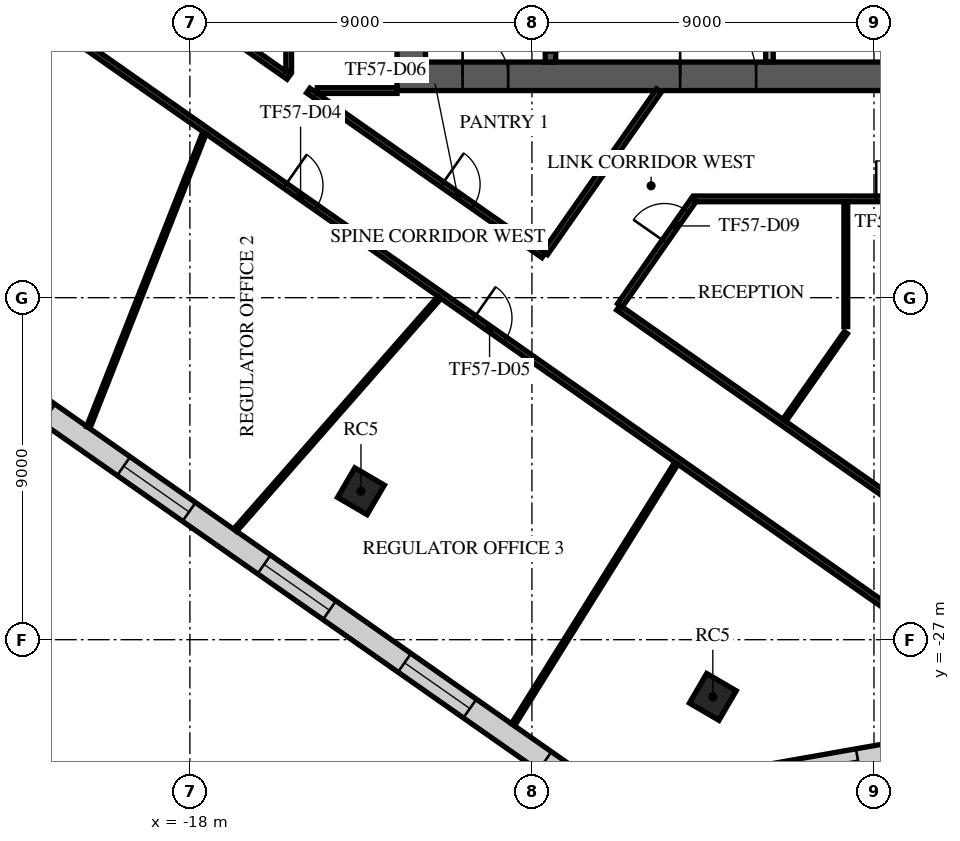
"""IFC4 building model, lengths in metres.
Left out: names, types, materials, properties, quantities, classifications, styles, units other than length and angle.
Written with IfcOpenShell. Run it as: python <this file> out.ifc"""

import sys

from ifc_helpers import new_model, si_unit, direction, frame, frame_2d, origin, origin_2d, place, context, subcontext, project, spatial, rectangle, extrude, element, fill, save


model = new_model("IFC4")
c1 = context("Model", 3, precision=1e-05, world=origin(), true_north=direction((0.0, 1.0)))
c2 = subcontext(c1, "Body", "Model", "MODEL_VIEW")
j1 = project(units=[si_unit("LENGTHUNIT", "METRE"), si_unit("PLANEANGLEUNIT", "RADIAN")], contexts=[c1])
p1 = place(None, origin())
s1 = spatial("IfcSite", under=j1, at=p1, CompositionType="ELEMENT")
p2 = place(p1, origin())
s2 = spatial("IfcBuilding", under=s1, at=p2, CompositionType="ELEMENT")
p3 = place(p2, frame((0.0, 0.0, 242.9)))
s3 = spatial("IfcBuildingStorey", under=s2, at=p3, CompositionType="ELEMENT", Elevation=242.9)
for number, where, z_axis, x_axis in (
    (1, (-13.499, -23.094, -0.36), (0.0, 0.0, 1.0), (0.505, 0.863, 0.0)),
    (2, (-4.24, -28.506, -0.36), (0.0, 0.0, 1.0), (0.505, 0.863, 0.0)),
):
    element("IfcColumn", number, at=place(p3, frame(where, z_axis=z_axis, x_axis=x_axis)), inside=s3, PredefinedType="COLUMN", context=c2, shape_type="SweptSolid", body=[
        extrude(rectangle(XDim=0.9, YDim=0.9, at=origin_2d()), origin(), (0.0, 0.0, 1.0), 4.36),
    ])
p4 = place(p3, frame((-12.55, -12.175, 0.0), z_axis=(0.0, 0.0, 1.0), x_axis=(1.0, 0.0, 0.0)))
e3 = element("IfcWall", 3, at=p4, inside=s3, PredefinedType="SHEAR", context=c2, shape_type="SweptSolid", body=[
    extrude(rectangle(XDim=25.1, YDim=0.75, at=frame_2d((12.55, 0.0))), origin(), (0.0, 0.0, 1.0), 3.64),
])
p5 = place(p4, frame((7.45, 0.0, 0.0)))
e4 = element("IfcOpeningElement", 4, at=p5, cuts=e3, PredefinedType="OPENING", context=c2, shape_type="SweptSolid", body=[
    extrude(rectangle(XDim=2.0, YDim=2.1, at=frame_2d((1.0, 1.05))), frame((0.0, 0.385, 0.0), z_axis=(0.0, -1.0, 0.0), x_axis=(1.0, 0.0, 0.0)), (0.0, 0.0, 1.0), 0.77),
])
p6 = place(p4, frame((17.575, 0.0, 0.0)))
e5 = element("IfcOpeningElement", 5, at=p6, cuts=e3, PredefinedType="OPENING", context=c2, shape_type="SweptSolid", body=[
    extrude(rectangle(XDim=1.2, YDim=2.1, at=frame_2d((0.6, 1.05))), frame((0.0, 0.385, 0.0), z_axis=(0.0, -1.0, 0.0), x_axis=(1.0, 0.0, 0.0)), (0.0, 0.0, 1.0), 0.77),
])
p7 = place(p4, frame((1.725, 0.0, 0.0)))
e6 = element("IfcOpeningElement", 6, at=p7, cuts=e3, PredefinedType="OPENING", context=c2, shape_type="SweptSolid", body=[
    extrude(rectangle(XDim=1.2, YDim=2.1, at=frame_2d((0.6, 1.05))), frame((0.0, 0.385, 0.0), z_axis=(0.0, -1.0, 0.0), x_axis=(1.0, 0.0, 0.0)), (0.0, 0.0, 1.0), 0.77),
])
p8 = place(p4, frame((22.175, 0.0, 0.0)))
e7 = element("IfcOpeningElement", 7, at=p8, cuts=e3, PredefinedType="OPENING", context=c2, shape_type="SweptSolid", body=[
    extrude(rectangle(XDim=1.2, YDim=2.1, at=frame_2d((0.6, 1.05))), frame((0.0, 0.385, 0.0), z_axis=(0.0, -1.0, 0.0), x_axis=(1.0, 0.0, 0.0)), (0.0, 0.0, 1.0), 0.77),
])
p9 = place(p3, frame((-12.175, -11.8, 0.0), z_axis=(0.0, 0.0, 1.0), x_axis=(0.0, 1.0, 0.0)))
e8 = element("IfcWall", 8, at=p9, inside=s3, PredefinedType="SHEAR", context=c2, shape_type="SweptSolid", body=[
    extrude(rectangle(XDim=23.6, YDim=0.75, at=frame_2d((11.8, 0.0))), origin(), (0.0, 0.0, 1.0), 3.64),
])
p10 = place(p9, frame((10.6, 0.0, 0.0)))
e9 = element("IfcOpeningElement", 9, at=p10, cuts=e8, PredefinedType="OPENING", context=c2, shape_type="SweptSolid", body=[
    extrude(rectangle(XDim=2.4, YDim=2.4, at=frame_2d((1.2, 1.2))), frame((0.0, 0.385, 0.0), z_axis=(0.0, -1.0, 0.0), x_axis=(1.0, 0.0, 0.0)), (0.0, 0.0, 1.0), 0.77),
])
p11 = place(p3, frame((-8.512, -4.55, 0.0), z_axis=(0.0, 0.0, 1.0), x_axis=(0.0, -1.0, 0.0)))
e10 = element("IfcWall", 10, at=p11, inside=s3, PredefinedType="SOLIDWALL", context=c2, shape_type="SweptSolid", body=[
    extrude(rectangle(XDim=7.25, YDim=0.275, at=frame_2d((3.625, 0.0))), origin(), (0.0, 0.0, 1.0), 3.64),
])
p12 = place(p11, frame((6.0, 0.0, 0.0)))
e11 = element("IfcOpeningElement", 11, at=p12, cuts=e10, PredefinedType="OPENING", context=c2, shape_type="SweptSolid", body=[
    extrude(rectangle(XDim=1.0, YDim=2.1, at=frame_2d((0.5, 1.05))), frame((0.0, 0.147, 0.0), z_axis=(0.0, -1.0, 0.0), x_axis=(1.0, 0.0, 0.0)), (0.0, 0.0, 1.0), 0.295),
])
p13 = place(p3, frame((-2.75, -11.795, 0.0), z_axis=(0.0, 0.0, 1.0), x_axis=(0.0, 1.0, 0.0)))
e12 = element("IfcWall", 12, at=p13, inside=s3, PredefinedType="PARTITIONING", context=c2, shape_type="SweptSolid", body=[
    extrude(rectangle(XDim=2.99, YDim=0.2, at=frame_2d((1.495, 0.0))), origin(), (0.0, 0.0, 1.0), 3.64),
])
p14 = place(p13, frame((0.657, 0.0, 0.0)))
e13 = element("IfcOpeningElement", 13, at=p14, cuts=e12, PredefinedType="OPENING", context=c2, shape_type="SweptSolid", body=[
    extrude(rectangle(XDim=1.8, YDim=2.1, at=frame_2d((0.9, 1.05))), frame((0.0, 0.11, 0.0), z_axis=(0.0, -1.0, 0.0), x_axis=(1.0, 0.0, 0.0)), (0.0, 0.0, 1.0), 0.22),
])
p15 = place(p3, frame((-31.815, -13.98, 0.0), z_axis=(0.0, 0.0, 1.0), x_axis=(0.819151180661, -0.573577669737, 0.0)))
e14 = element("IfcWall", 14, at=p15, inside=s3, PredefinedType="STANDARD", context=c2, shape_type="SweptSolid", body=[
    extrude(rectangle(XDim=36.086, YDim=0.6, at=frame_2d((18.043, 0.0))), origin(), (0.0, 0.0, 1.0), 3.64),
])
p16 = place(p15, frame((1.205, 0.0, 0.9)))
e15 = element("IfcOpeningElement", 15, at=p16, cuts=e14, PredefinedType="OPENING", context=c2, shape_type="SweptSolid", body=[
    extrude(rectangle(XDim=2.1, YDim=2.1, at=frame_2d((1.05, 1.05))), frame((0.0, 0.31, 0.0), z_axis=(0.0, -1.0, 0.0), x_axis=(1.0, 0.0, 0.0)), (0.0, 0.0, 1.0), 0.62),
])
p17 = place(p15, frame((5.716, 0.0, 0.9)))
e16 = element("IfcOpeningElement", 16, at=p17, cuts=e14, PredefinedType="OPENING", context=c2, shape_type="SweptSolid", body=[
    extrude(rectangle(XDim=2.1, YDim=2.1, at=frame_2d((1.05, 1.05))), frame((0.0, 0.31, 0.0), z_axis=(0.0, -1.0, 0.0), x_axis=(1.0, 0.0, 0.0)), (0.0, 0.0, 1.0), 0.62),
])
p18 = place(p15, frame((10.227, 0.0, 0.9)))
e17 = element("IfcOpeningElement", 17, at=p18, cuts=e14, PredefinedType="OPENING", context=c2, shape_type="SweptSolid", body=[
    extrude(rectangle(XDim=2.1, YDim=2.1, at=frame_2d((1.05, 1.05))), frame((0.0, 0.31, 0.0), z_axis=(0.0, -1.0, 0.0), x_axis=(1.0, 0.0, 0.0)), (0.0, 0.0, 1.0), 0.62),
])
p19 = place(p15, frame((14.738, 0.0, 0.9)))
e18 = element("IfcOpeningElement", 18, at=p19, cuts=e14, PredefinedType="OPENING", context=c2, shape_type="SweptSolid", body=[
    extrude(rectangle(XDim=2.1, YDim=2.1, at=frame_2d((1.05, 1.05))), frame((0.0, 0.31, 0.0), z_axis=(0.0, -1.0, 0.0), x_axis=(1.0, 0.0, 0.0)), (0.0, 0.0, 1.0), 0.62),
])
p20 = place(p15, frame((19.249, 0.0, 0.9)))
e19 = element("IfcOpeningElement", 19, at=p20, cuts=e14, PredefinedType="OPENING", context=c2, shape_type="SweptSolid", body=[
    extrude(rectangle(XDim=2.1, YDim=2.1, at=frame_2d((1.05, 1.05))), frame((0.0, 0.31, 0.0), z_axis=(0.0, -1.0, 0.0), x_axis=(1.0, 0.0, 0.0)), (0.0, 0.0, 1.0), 0.62),
])
p21 = place(p15, frame((23.759, 0.0, 0.9)))
e20 = element("IfcOpeningElement", 20, at=p21, cuts=e14, PredefinedType="OPENING", context=c2, shape_type="SweptSolid", body=[
    extrude(rectangle(XDim=2.1, YDim=2.1, at=frame_2d((1.05, 1.05))), frame((0.0, 0.31, 0.0), z_axis=(0.0, -1.0, 0.0), x_axis=(1.0, 0.0, 0.0)), (0.0, 0.0, 1.0), 0.62),
])
p22 = place(p15, frame((28.27, 0.0, 0.9)))
e21 = element("IfcOpeningElement", 21, at=p22, cuts=e14, PredefinedType="OPENING", context=c2, shape_type="SweptSolid", body=[
    extrude(rectangle(XDim=2.1, YDim=2.1, at=frame_2d((1.05, 1.05))), frame((0.0, 0.31, 0.0), z_axis=(0.0, -1.0, 0.0), x_axis=(1.0, 0.0, 0.0)), (0.0, 0.0, 1.0), 0.62),
])
p23 = place(p15, frame((32.781, 0.0, 0.9)))
e22 = element("IfcOpeningElement", 22, at=p23, cuts=e14, PredefinedType="OPENING", context=c2, shape_type="SweptSolid", body=[
    extrude(rectangle(XDim=2.1, YDim=2.1, at=frame_2d((1.05, 1.05))), frame((0.0, 0.31, 0.0), z_axis=(0.0, -1.0, 0.0), x_axis=(1.0, 0.0, 0.0)), (0.0, 0.0, 1.0), 0.62),
])
p24 = place(p3, frame((-3.18, -30.654, 0.0), z_axis=(0.0, 0.0, 1.0), x_axis=(0.98480904719, 0.173640837858, 0.0)))
e23 = element("IfcWall", 23, at=p24, inside=s3, PredefinedType="STANDARD", context=c2, shape_type="SweptSolid", body=[
    extrude(rectangle(XDim=8.0, YDim=0.6, at=frame_2d((4.0, 0.0))), origin(), (0.0, 0.0, 1.0), 3.64),
])
p25 = place(p24, frame((1.2, 0.0, 0.9)))
e24 = element("IfcOpeningElement", 24, at=p25, cuts=e23, PredefinedType="OPENING", context=c2, shape_type="SweptSolid", body=[
    extrude(rectangle(XDim=1.6, YDim=2.1, at=frame_2d((0.8, 1.05))), frame((0.0, 0.31, 0.0), z_axis=(0.0, -1.0, 0.0), x_axis=(1.0, 0.0, 0.0)), (0.0, 0.0, 1.0), 0.62),
])
p26 = place(p24, frame((5.2, 0.0, 0.9)))
e25 = element("IfcOpeningElement", 25, at=p26, cuts=e23, PredefinedType="OPENING", context=c2, shape_type="SweptSolid", body=[
    extrude(rectangle(XDim=1.6, YDim=2.1, at=frame_2d((0.8, 1.05))), frame((0.0, 0.31, 0.0), z_axis=(0.0, -1.0, 0.0), x_axis=(1.0, 0.0, 0.0)), (0.0, 0.0, 1.0), 0.62),
])
p27 = place(p3, frame((-26.231, -7.537, 0.0), z_axis=(0.0, 0.0, 1.0), x_axis=(0.819166569978, -0.573555690959, 0.0)))
e26 = element("IfcWall", 26, at=p27, inside=s3, PredefinedType="PARTITIONING", context=c2, shape_type="SweptSolid", body=[
    extrude(rectangle(XDim=34.403, YDim=0.15, at=frame_2d((17.201, 0.0))), origin(), (0.0, 0.0, 1.0), 3.24),
])
p28 = place(p27, frame((3.05, 0.0, 0.0)))
e27 = element("IfcOpeningElement", 27, at=p28, cuts=e26, PredefinedType="OPENING", context=c2, shape_type="SweptSolid", body=[
    extrude(rectangle(XDim=1.8, YDim=2.1, at=frame_2d((0.9, 1.05))), frame((0.0, 0.085, 0.0), z_axis=(0.0, -1.0, 0.0), x_axis=(1.0, 0.0, 0.0)), (0.0, 0.0, 1.0), 0.17),
])
p29 = place(p27, frame((13.103, 0.0, 0.0)))
e28 = element("IfcOpeningElement", 28, at=p29, cuts=e26, PredefinedType="OPENING", context=c2, shape_type="SweptSolid", body=[
    extrude(rectangle(XDim=1.0, YDim=2.1, at=frame_2d((0.5, 1.05))), frame((0.0, 0.085, 0.0), z_axis=(0.0, -1.0, 0.0), x_axis=(1.0, 0.0, 0.0)), (0.0, 0.0, 1.0), 0.17),
])
p30 = place(p27, frame((19.173, 0.0, 0.0)))
e29 = element("IfcOpeningElement", 29, at=p30, cuts=e26, PredefinedType="OPENING", context=c2, shape_type="SweptSolid", body=[
    extrude(rectangle(XDim=1.0, YDim=2.1, at=frame_2d((0.5, 1.05))), frame((0.0, 0.085, 0.0), z_axis=(0.0, -1.0, 0.0), x_axis=(1.0, 0.0, 0.0)), (0.0, 0.0, 1.0), 0.17),
])
p31 = place(p3, frame((-24.854, -5.571, 0.0), z_axis=(0.0, 0.0, 1.0), x_axis=(0.819176259714, -0.573541851586, 0.0)))
e30 = element("IfcWall", 30, at=p31, inside=s3, PredefinedType="PARTITIONING", context=c2, shape_type="SweptSolid", body=[
    extrude(rectangle(XDim=11.54, YDim=0.15, at=frame_2d((5.77, 0.0))), origin(), (0.0, 0.0, 1.0), 3.24),
])
p32 = place(p31, frame((6.8, 0.0, 0.0)))
e31 = element("IfcOpeningElement", 31, at=p32, cuts=e30, PredefinedType="OPENING", context=c2, shape_type="SweptSolid", body=[
    extrude(rectangle(XDim=1.0, YDim=2.1, at=frame_2d((0.5, 1.05))), frame((0.0, 0.085, 0.0), z_axis=(0.0, -1.0, 0.0), x_axis=(1.0, 0.0, 0.0)), (0.0, 0.0, 1.0), 0.17),
])
p33 = place(p3, frame((-15.4, -12.046, 0.0), z_axis=(0.0, 0.0, 1.0), x_axis=(0.0, 1.0, 0.0)))
e32 = element("IfcWall", 32, at=p33, inside=s3, PredefinedType="PARTITIONING", context=c2, shape_type="SweptSolid", body=[
    extrude(rectangle(XDim=27.446, YDim=0.15, at=frame_2d((13.723, 0.0))), origin(), (0.0, 0.0, 1.0), 3.24),
])
p34 = place(p33, frame((12.961, 0.0, 0.0)))
e33 = element("IfcOpeningElement", 33, at=p34, cuts=e32, PredefinedType="OPENING", context=c2, shape_type="SweptSolid", body=[
    extrude(rectangle(XDim=1.0, YDim=2.1, at=frame_2d((0.5, 1.05))), frame((0.0, 0.085, 0.0), z_axis=(0.0, -1.0, 0.0), x_axis=(1.0, 0.0, 0.0)), (0.0, 0.0, 1.0), 0.17),
])
p35 = place(p3, frame((-14.886, -12.55, 0.0), z_axis=(0.0, 0.0, 1.0), x_axis=(0.819131763787, -0.57360539882, 0.0)))
e34 = element("IfcWall", 34, at=p35, inside=s3, PredefinedType="PARTITIONING", context=c2, shape_type="SweptSolid", body=[
    extrude(rectangle(XDim=7.559, YDim=0.15, at=frame_2d((3.78, 0.0))), origin(), (0.0, 0.0, 1.0), 3.24),
])
p36 = place(p35, frame((4.3, 0.0, 0.0)))
e35 = element("IfcOpeningElement", 35, at=p36, cuts=e34, PredefinedType="OPENING", context=c2, shape_type="SweptSolid", body=[
    extrude(rectangle(XDim=1.0, YDim=2.1, at=frame_2d((0.5, 1.05))), frame((0.0, 0.085, 0.0), z_axis=(0.0, -1.0, 0.0), x_axis=(1.0, 0.0, 0.0)), (0.0, 0.0, 1.0), 0.17),
])
p37 = place(p3, frame((-14.648, -12.55, 0.0), z_axis=(0.0, 0.0, 1.0), x_axis=(1.0, 0.0, 0.0)))
e36 = element("IfcWall", 36, at=p37, inside=s3, PredefinedType="PARTITIONING", context=c2, shape_type="SweptSolid", body=[
    extrude(rectangle(XDim=2.098, YDim=0.15, at=frame_2d((1.049, 0.0))), origin(), (0.0, 0.0, 1.0), 3.24),
])
p38 = place(p3, frame((-8.651, -16.825, 0.0), z_axis=(0.0, 0.0, 1.0), x_axis=(0.57354712093, 0.819172570386, 0.0)))
e37 = element("IfcWall", 37, at=p38, inside=s3, PredefinedType="PARTITIONING", context=c2, shape_type="SweptSolid", body=[
    extrude(rectangle(XDim=5.218, YDim=0.15, at=frame_2d((2.609, 0.0))), origin(), (0.0, 0.0, 1.0), 3.24),
])
p39 = place(p3, frame((-6.728, -18.263, 0.0), z_axis=(0.0, 0.0, 1.0), x_axis=(0.819171177891, -0.573549109765, 0.0)))
e38 = element("IfcWall", 38, at=p39, inside=s3, PredefinedType="PARTITIONING", context=c2, shape_type="SweptSolid", body=[
    extrude(rectangle(XDim=12.274, YDim=0.15, at=frame_2d((6.137, 0.0))), origin(), (0.0, 0.0, 1.0), 3.24),
])
p40 = place(p3, frame((-6.685, -18.201, 0.0), z_axis=(0.0, 0.0, 1.0), x_axis=(0.573438386326, 0.819248690623, 0.0)))
e39 = element("IfcWall", 39, at=p40, inside=s3, PredefinedType="PARTITIONING", context=c2, shape_type="SweptSolid", body=[
    extrude(rectangle(XDim=3.42, YDim=0.15, at=frame_2d((1.71, 0.0))), origin(), (0.0, 0.0, 1.0), 3.24),
])
p41 = place(p40, frame((2.05, 0.0, 0.0)))
e40 = element("IfcOpeningElement", 40, at=p41, cuts=e39, PredefinedType="OPENING", context=c2, shape_type="SweptSolid", body=[
    extrude(rectangle(XDim=1.0, YDim=2.1, at=frame_2d((0.5, 1.05))), frame((0.0, 0.085, 0.0), z_axis=(0.0, -1.0, 0.0), x_axis=(1.0, 0.0, 0.0)), (0.0, 0.0, 1.0), 0.17),
])
p42 = place(p3, frame((-4.723, -15.4, 0.0), z_axis=(0.0, 0.0, 1.0), x_axis=(1.0, 0.0, 0.0)))
e41 = element("IfcWall", 41, at=p42, inside=s3, PredefinedType="PARTITIONING", context=c2, shape_type="SweptSolid", body=[
    extrude(rectangle(XDim=20.123, YDim=0.15, at=frame_2d((10.062, 0.0))), origin(), (0.0, 0.0, 1.0), 3.24),
])
p43 = place(p42, frame((13.282, 0.0, 0.0)))
e42 = element("IfcOpeningElement", 42, at=p43, cuts=e41, PredefinedType="OPENING", context=c2, shape_type="SweptSolid", body=[
    extrude(rectangle(XDim=1.8, YDim=2.1, at=frame_2d((0.9, 1.05))), frame((0.0, 0.085, 0.0), z_axis=(0.0, -1.0, 0.0), x_axis=(1.0, 0.0, 0.0)), (0.0, 0.0, 1.0), 0.17),
])
p44 = place(p42, frame((4.782, 0.0, 0.0)))
e43 = element("IfcOpeningElement", 43, at=p44, cuts=e41, PredefinedType="OPENING", context=c2, shape_type="SweptSolid", body=[
    extrude(rectangle(XDim=1.0, YDim=2.1, at=frame_2d((0.5, 1.05))), frame((0.0, 0.085, 0.0), z_axis=(0.0, -1.0, 0.0), x_axis=(1.0, 0.0, 0.0)), (0.0, 0.0, 1.0), 0.17),
])
p45 = place(p3, frame((-20.673, -21.413, 0.0), z_axis=(0.0, 0.0, 1.0), x_axis=(0.367046287702, 0.930202678283, 0.0)))
e44 = element("IfcWall", 44, at=p45, inside=s3, PredefinedType="PARTITIONING", context=c2, shape_type="SweptSolid", body=[
    extrude(rectangle(XDim=8.321, YDim=0.1, at=frame_2d((4.161, 0.0))), origin(), (0.0, 0.0, 1.0), 3.24),
])
p46 = place(p3, frame((-16.809, -24.119, 0.0), z_axis=(0.0, 0.0, 1.0), x_axis=(0.659598527061, 0.75161810988, 0.0)))
e45 = element("IfcWall", 45, at=p46, inside=s3, PredefinedType="PARTITIONING", context=c2, shape_type="SweptSolid", body=[
    extrude(rectangle(XDim=8.148, YDim=0.1, at=frame_2d((4.074, 0.0))), origin(), (0.0, 0.0, 1.0), 3.24),
])
p47 = place(p3, frame((-9.498, -29.238, 0.0), z_axis=(0.0, 0.0, 1.0), x_axis=(0.529739230274, 0.848160567292, 0.0)))
e46 = element("IfcWall", 46, at=p47, inside=s3, PredefinedType="PARTITIONING", context=c2, shape_type="SweptSolid", body=[
    extrude(rectangle(XDim=8.113, YDim=0.1, at=frame_2d((4.056, 0.0))), origin(), (0.0, 0.0, 1.0), 3.64),
])
p48 = place(p3, frame((-2.359, -21.231, 0.0), z_axis=(0.0, 0.0, 1.0), x_axis=(0.573549469352, 0.819170926123, 0.0)))
e47 = element("IfcWall", 47, at=p48, inside=s3, PredefinedType="PARTITIONING", context=c2, shape_type="SweptSolid", body=[
    extrude(rectangle(XDim=2.821, YDim=0.1, at=frame_2d((1.41, 0.0))), origin(), (0.0, 0.0, 1.0), 3.64),
])
p49 = place(p3, frame((-0.741, -18.761, 0.0), z_axis=(0.0, 0.0, 1.0), x_axis=(0.0, 1.0, 0.0)))
e48 = element("IfcWall", 48, at=p49, inside=s3, PredefinedType="PARTITIONING", context=c2, shape_type="SweptSolid", body=[
    extrude(rectangle(XDim=3.286, YDim=0.1, at=frame_2d((1.643, 0.0))), origin(), (0.0, 0.0, 1.0), 3.64),
])
p50 = place(p5, origin())
e49 = element("IfcDoor", 49, at=p50, inside=s3, OperationType="SINGLE_SWING_LEFT", PredefinedType="DOOR", context=c2, shape_type="SweptSolid", body=[
    extrude(rectangle(XDim=2.0, YDim=2.1, at=frame_2d((1.0, 1.05))), frame((0.0, 0.025, 0.0), z_axis=(0.0, -1.0, 0.0), x_axis=(1.0, 0.0, 0.0)), (0.0, 0.0, 1.0), 0.05),
])
fill(e4, e49)
p51 = place(p7, origin())
e50 = element("IfcDoor", 50, at=p51, inside=s3, OperationType="SINGLE_SWING_LEFT", PredefinedType="DOOR", context=c2, shape_type="SweptSolid", body=[
    extrude(rectangle(XDim=1.2, YDim=2.1, at=frame_2d((0.6, 1.05))), frame((0.0, 0.025, 0.0), z_axis=(0.0, -1.0, 0.0), x_axis=(1.0, 0.0, 0.0)), (0.0, 0.0, 1.0), 0.05),
])
fill(e6, e50)
p52 = place(p19, origin())
e51 = element("IfcWindow", 51, at=p52, inside=s3, PartitioningType="SINGLE_PANEL", PredefinedType="WINDOW", context=c2, shape_type="SweptSolid", body=[
    extrude(rectangle(XDim=2.1, YDim=2.1, at=frame_2d((1.05, 1.05))), frame((0.0, 0.03, 0.0), z_axis=(0.0, -1.0, 0.0), x_axis=(1.0, 0.0, 0.0)), (0.0, 0.0, 1.0), 0.06),
])
fill(e18, e51)
p53 = place(p20, origin())
e52 = element("IfcWindow", 52, at=p53, inside=s3, PartitioningType="SINGLE_PANEL", PredefinedType="WINDOW", context=c2, shape_type="SweptSolid", body=[
    extrude(rectangle(XDim=2.1, YDim=2.1, at=frame_2d((1.05, 1.05))), frame((0.0, 0.03, 0.0), z_axis=(0.0, -1.0, 0.0), x_axis=(1.0, 0.0, 0.0)), (0.0, 0.0, 1.0), 0.06),
])
fill(e19, e52)
p54 = place(p21, origin())
e53 = element("IfcWindow", 53, at=p54, inside=s3, PartitioningType="SINGLE_PANEL", PredefinedType="WINDOW", context=c2, shape_type="SweptSolid", body=[
    extrude(rectangle(XDim=2.1, YDim=2.1, at=frame_2d((1.05, 1.05))), frame((0.0, 0.03, 0.0), z_axis=(0.0, -1.0, 0.0), x_axis=(1.0, 0.0, 0.0)), (0.0, 0.0, 1.0), 0.06),
])
fill(e20, e53)
p55 = place(p22, origin())
e54 = element("IfcWindow", 54, at=p55, inside=s3, PartitioningType="SINGLE_PANEL", PredefinedType="WINDOW", context=c2, shape_type="SweptSolid", body=[
    extrude(rectangle(XDim=2.1, YDim=2.1, at=frame_2d((1.05, 1.05))), frame((0.0, 0.03, 0.0), z_axis=(0.0, -1.0, 0.0), x_axis=(1.0, 0.0, 0.0)), (0.0, 0.0, 1.0), 0.06),
])
fill(e21, e54)
p56 = place(p25, origin())
e55 = element("IfcWindow", 55, at=p56, inside=s3, PartitioningType="SINGLE_PANEL", PredefinedType="WINDOW", context=c2, shape_type="SweptSolid", body=[
    extrude(rectangle(XDim=1.6, YDim=2.1, at=frame_2d((0.8, 1.05))), frame((0.0, 0.03, 0.0), z_axis=(0.0, -1.0, 0.0), x_axis=(1.0, 0.0, 0.0)), (0.0, 0.0, 1.0), 0.06),
])
fill(e24, e55)
p57 = place(p29, frame((1.0, 0.0, 0.0), z_axis=(0.0, 0.0, 1.0), x_axis=(-1.0, 0.0, 0.0)))
e56 = element("IfcDoor", 56, at=p57, inside=s3, OperationType="SINGLE_SWING_LEFT", PredefinedType="DOOR", context=c2, shape_type="SweptSolid", body=[
    extrude(rectangle(XDim=1.0, YDim=2.1, at=frame_2d((0.5, 1.05))), frame((0.0, 0.025, 0.0), z_axis=(0.0, -1.0, 0.0), x_axis=(1.0, 0.0, 0.0)), (0.0, 0.0, 1.0), 0.05),
])
fill(e28, e56)
p58 = place(p30, frame((1.0, 0.0, 0.0), z_axis=(0.0, 0.0, 1.0), x_axis=(-1.0, 0.0, 0.0)))
e57 = element("IfcDoor", 57, at=p58, inside=s3, OperationType="SINGLE_SWING_RIGHT", PredefinedType="DOOR", context=c2, shape_type="SweptSolid", body=[
    extrude(rectangle(XDim=1.0, YDim=2.1, at=frame_2d((0.5, 1.05))), frame((0.0, 0.025, 0.0), z_axis=(0.0, -1.0, 0.0), x_axis=(1.0, 0.0, 0.0)), (0.0, 0.0, 1.0), 0.05),
])
fill(e29, e57)
p59 = place(p36, origin())
e58 = element("IfcDoor", 58, at=p59, inside=s3, OperationType="SINGLE_SWING_LEFT", PredefinedType="DOOR", context=c2, shape_type="SweptSolid", body=[
    extrude(rectangle(XDim=1.0, YDim=2.1, at=frame_2d((0.5, 1.05))), frame((0.0, 0.025, 0.0), z_axis=(0.0, -1.0, 0.0), x_axis=(1.0, 0.0, 0.0)), (0.0, 0.0, 1.0), 0.05),
])
fill(e35, e58)
p60 = place(p41, frame((1.0, 0.0, 0.0), z_axis=(0.0, 0.0, 1.0), x_axis=(-1.0, 0.0, 0.0)))
e59 = element("IfcDoor", 59, at=p60, inside=s3, OperationType="SINGLE_SWING_LEFT", PredefinedType="DOOR", context=c2, shape_type="SweptSolid", body=[
    extrude(rectangle(XDim=1.0, YDim=2.1, at=frame_2d((0.5, 1.05))), frame((0.0, 0.025, 0.0), z_axis=(0.0, -1.0, 0.0), x_axis=(1.0, 0.0, 0.0)), (0.0, 0.0, 1.0), 0.05),
])
fill(e40, e59)
p61 = place(p44, frame((1.0, 0.0, 0.0), z_axis=(0.0, 0.0, 1.0), x_axis=(-1.0, 0.0, 0.0)))
e60 = element("IfcDoor", 60, at=p61, inside=s3, OperationType="SINGLE_SWING_RIGHT", PredefinedType="DOOR", context=c2, shape_type="SweptSolid", body=[
    extrude(rectangle(XDim=1.0, YDim=2.1, at=frame_2d((0.5, 1.05))), frame((0.0, 0.025, 0.0), z_axis=(0.0, -1.0, 0.0), x_axis=(1.0, 0.0, 0.0)), (0.0, 0.0, 1.0), 0.05),
])
fill(e43, e60)
save(model, sys.argv[1])
